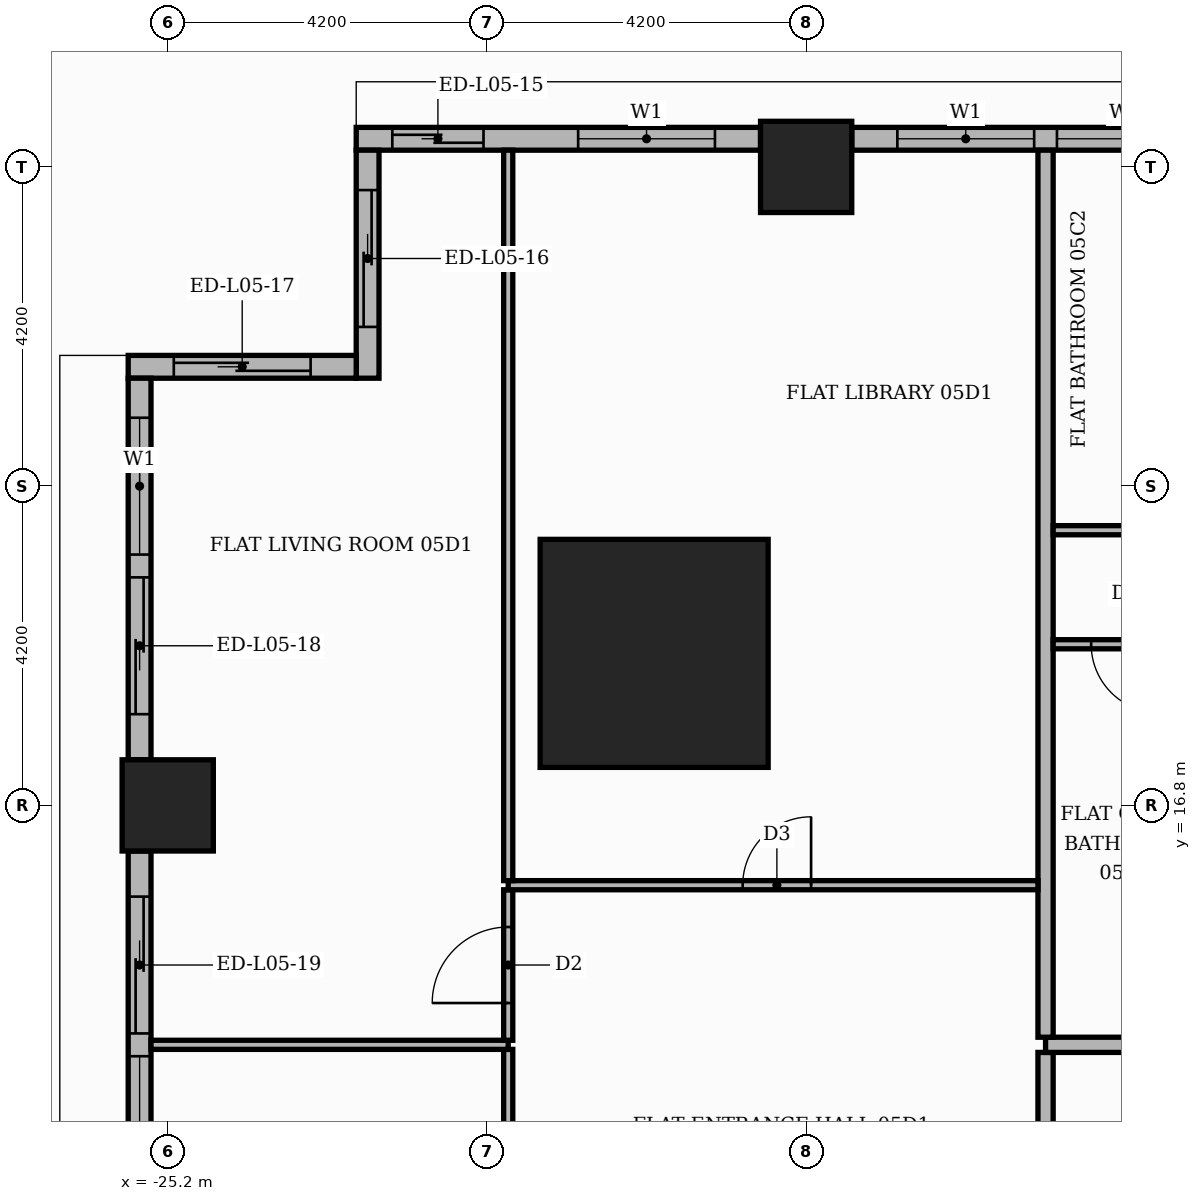
"""IFC4 building model, lengths in metres.
Left out: names, types, materials, properties, quantities, classifications, styles, units other than length and angle.
Written with IfcOpenShell. Run it as: python <this file> out.ifc"""

import sys

from ifc_helpers import new_model, si_unit, direction, frame, frame_2d, origin, origin_2d, place, context, subcontext, project, spatial, rectangle, extrude, element, fill, save


model = new_model("IFC4")
c1 = context("Model", 3, precision=1e-05, world=origin(), true_north=direction((0.0, 1.0)))
c2 = subcontext(c1, "Body", "Model", "MODEL_VIEW")
j1 = project(units=[si_unit("LENGTHUNIT", "METRE"), si_unit("PLANEANGLEUNIT", "RADIAN")], contexts=[c1])
p1 = place(None, origin())
s1 = spatial("IfcSite", under=j1, at=p1, CompositionType="ELEMENT")
p2 = place(p1, origin())
s2 = spatial("IfcBuilding", under=s1, at=p2, CompositionType="ELEMENT")
p3 = place(p2, frame((0.0, 0.0, 27.0)))
s3 = spatial("IfcBuildingStorey", under=s2, at=p3, CompositionType="ELEMENT", Elevation=27.0)
p4 = place(p3, frame((-18.8, 18.8, 0.0), z_axis=(0.0, 0.0, 1.0), x_axis=(1.0, 0.0, 0.0)))
e1 = element("IfcColumn", 1, at=p4, inside=s3, PredefinedType="COLUMN", context=c2, shape_type="SweptSolid", body=[
    extrude(rectangle(XDim=3.0, YDim=3.0, at=origin_2d()), origin(), (0.0, 0.0, 1.0), 3.9),
])
for number, where, z_axis, x_axis in (
    (2, (-16.8, 25.2, 0.0), (0.0, 0.0, 1.0), (1.0, 0.0, 0.0)),
    (3, (-25.2, 16.8, 0.0), (0.0, 0.0, 1.0), (1.0, 0.0, 0.0)),
):
    element("IfcColumn", number, at=place(p3, frame(where, z_axis=z_axis, x_axis=x_axis)), inside=s3, PredefinedType="COLUMN", context=c2, shape_type="SweptSolid", body=[
        extrude(rectangle(XDim=1.2, YDim=1.2, at=origin_2d()), origin(), (0.0, 0.0, 1.0), 3.9),
    ])
p5 = place(p3, frame((-9.0, 25.57, 0.0), z_axis=(0.0, 0.0, 1.0), x_axis=(-1.0, 0.0, 0.0)))
e4 = element("IfcWall", 4, at=p5, inside=s3, PredefinedType="STANDARD", context=c2, shape_type="SweptSolid", body=[
    extrude(rectangle(XDim=7.2, YDim=0.3, at=frame_2d((3.6, 0.0))), origin(), (0.0, 0.0, 1.0), 3.48),
])
p6 = place(p5, frame((0.6, 0.0, 0.9)))
e5 = element("IfcOpeningElement", 5, at=p6, cuts=e4, PredefinedType="OPENING", context=c2, shape_type="SweptSolid", body=[
    extrude(rectangle(XDim=1.8, YDim=2.1, at=frame_2d((0.9, 1.05))), frame((0.0, 0.16, 0.0), z_axis=(0.0, -1.0, 0.0), x_axis=(1.0, 0.0, 0.0)), (0.0, 0.0, 1.0), 0.32),
])
p7 = place(p5, frame((2.7, 0.0, 0.9)))
e6 = element("IfcOpeningElement", 6, at=p7, cuts=e4, PredefinedType="OPENING", context=c2, shape_type="SweptSolid", body=[
    extrude(rectangle(XDim=1.8, YDim=2.1, at=frame_2d((0.9, 1.05))), frame((0.0, 0.16, 0.0), z_axis=(0.0, -1.0, 0.0), x_axis=(1.0, 0.0, 0.0)), (0.0, 0.0, 1.0), 0.32),
])
p8 = place(p5, frame((4.8, 0.0, 0.9)))
e7 = element("IfcOpeningElement", 7, at=p8, cuts=e4, PredefinedType="OPENING", context=c2, shape_type="SweptSolid", body=[
    extrude(rectangle(XDim=1.8, YDim=2.1, at=frame_2d((0.9, 1.05))), frame((0.0, 0.16, 0.0), z_axis=(0.0, -1.0, 0.0), x_axis=(1.0, 0.0, 0.0)), (0.0, 0.0, 1.0), 0.32),
])
p9 = place(p3, frame((-17.4, 25.57, 0.0), z_axis=(0.0, 0.0, 1.0), x_axis=(-1.0, 0.0, 0.0)))
e8 = element("IfcWall", 8, at=p9, inside=s3, PredefinedType="STANDARD", context=c2, shape_type="SweptSolid", body=[
    extrude(rectangle(XDim=5.32, YDim=0.3, at=frame_2d((2.66, 0.0))), origin(), (0.0, 0.0, 1.0), 3.48),
])
p10 = place(p9, frame((0.6, 0.0, 0.9)))
e9 = element("IfcOpeningElement", 9, at=p10, cuts=e8, PredefinedType="OPENING", context=c2, shape_type="SweptSolid", body=[
    extrude(rectangle(XDim=1.8, YDim=2.1, at=frame_2d((0.9, 1.05))), frame((0.0, 0.16, 0.0), z_axis=(0.0, -1.0, 0.0), x_axis=(1.0, 0.0, 0.0)), (0.0, 0.0, 1.0), 0.32),
])
p11 = place(p9, frame((3.645, 0.0, 0.0)))
e10 = element("IfcOpeningElement", 10, at=p11, cuts=e8, PredefinedType="OPENING", context=c2, shape_type="SweptSolid", body=[
    extrude(rectangle(XDim=1.2, YDim=2.4, at=frame_2d((0.6, 1.2))), frame((0.0, 0.16, 0.0), z_axis=(0.0, -1.0, 0.0), x_axis=(1.0, 0.0, 0.0)), (0.0, 0.0, 1.0), 0.32),
])
p12 = place(p3, frame((-22.57, 25.42, 0.0), z_axis=(0.0, 0.0, 1.0), x_axis=(0.0, -1.0, 0.0)))
e11 = element("IfcWall", 11, at=p12, inside=s3, PredefinedType="STANDARD", context=c2, shape_type="SweptSolid", body=[
    extrude(rectangle(XDim=3.0, YDim=0.3, at=frame_2d((1.5, 0.0))), origin(), (0.0, 0.0, 1.0), 3.48),
])
p13 = place(p12, frame((0.525, 0.0, 0.0)))
e12 = element("IfcOpeningElement", 12, at=p13, cuts=e11, PredefinedType="OPENING", context=c2, shape_type="SweptSolid", body=[
    extrude(rectangle(XDim=1.8, YDim=2.4, at=frame_2d((0.9, 1.2))), frame((0.0, 0.16, 0.0), z_axis=(0.0, -1.0, 0.0), x_axis=(1.0, 0.0, 0.0)), (0.0, 0.0, 1.0), 0.32),
])
p14 = place(p3, frame((-22.72, 22.57, 0.0), z_axis=(0.0, 0.0, 1.0), x_axis=(-1.0, 0.0, 0.0)))
e13 = element("IfcWall", 13, at=p14, inside=s3, PredefinedType="STANDARD", context=c2, shape_type="SweptSolid", body=[
    extrude(rectangle(XDim=3.0, YDim=0.3, at=frame_2d((1.5, 0.0))), origin(), (0.0, 0.0, 1.0), 3.48),
])
p15 = place(p14, frame((0.6, 0.0, 0.0)))
e14 = element("IfcOpeningElement", 14, at=p15, cuts=e13, PredefinedType="OPENING", context=c2, shape_type="SweptSolid", body=[
    extrude(rectangle(XDim=1.8, YDim=2.4, at=frame_2d((0.9, 1.2))), frame((0.0, 0.16, 0.0), z_axis=(0.0, -1.0, 0.0), x_axis=(1.0, 0.0, 0.0)), (0.0, 0.0, 1.0), 0.32),
])
p16 = place(p3, frame((-25.57, 22.42, 0.0), z_axis=(0.0, 0.0, 1.0), x_axis=(0.0, -1.0, 0.0)))
e15 = element("IfcWall", 15, at=p16, inside=s3, PredefinedType="STANDARD", context=c2, shape_type="SweptSolid", body=[
    extrude(rectangle(XDim=5.02, YDim=0.3, at=frame_2d((2.51, 0.0))), origin(), (0.0, 0.0, 1.0), 3.48),
])
p17 = place(p16, frame((0.52, 0.0, 0.9)))
e16 = element("IfcOpeningElement", 16, at=p17, cuts=e15, PredefinedType="OPENING", context=c2, shape_type="SweptSolid", body=[
    extrude(rectangle(XDim=1.8, YDim=2.1, at=frame_2d((0.9, 1.05))), frame((0.0, 0.16, 0.0), z_axis=(0.0, -1.0, 0.0), x_axis=(1.0, 0.0, 0.0)), (0.0, 0.0, 1.0), 0.32),
])
p18 = place(p16, frame((2.62, 0.0, 0.0)))
e17 = element("IfcOpeningElement", 17, at=p18, cuts=e15, PredefinedType="OPENING", context=c2, shape_type="SweptSolid", body=[
    extrude(rectangle(XDim=1.8, YDim=2.4, at=frame_2d((0.9, 1.2))), frame((0.0, 0.16, 0.0), z_axis=(0.0, -1.0, 0.0), x_axis=(1.0, 0.0, 0.0)), (0.0, 0.0, 1.0), 0.32),
])
p19 = place(p3, frame((-25.57, 16.2, 0.0), z_axis=(0.0, 0.0, 1.0), x_axis=(0.0, -1.0, 0.0)))
e18 = element("IfcWall", 18, at=p19, inside=s3, PredefinedType="STANDARD", context=c2, shape_type="SweptSolid", body=[
    extrude(rectangle(XDim=7.2, YDim=0.3, at=frame_2d((3.6, 0.0))), origin(), (0.0, 0.0, 1.0), 3.48),
])
p20 = place(p19, frame((0.6, 0.0, 0.0)))
e19 = element("IfcOpeningElement", 19, at=p20, cuts=e18, PredefinedType="OPENING", context=c2, shape_type="SweptSolid", body=[
    extrude(rectangle(XDim=1.8, YDim=2.4, at=frame_2d((0.9, 1.2))), frame((0.0, 0.16, 0.0), z_axis=(0.0, -1.0, 0.0), x_axis=(1.0, 0.0, 0.0)), (0.0, 0.0, 1.0), 0.32),
])
p21 = place(p19, frame((2.7, 0.0, 0.9)))
e20 = element("IfcOpeningElement", 20, at=p21, cuts=e18, PredefinedType="OPENING", context=c2, shape_type="SweptSolid", body=[
    extrude(rectangle(XDim=3.9, YDim=2.1, at=frame_2d((1.95, 1.05))), frame((0.0, 0.16, 0.0), z_axis=(0.0, -1.0, 0.0), x_axis=(1.0, 0.0, 0.0)), (0.0, 0.0, 1.0), 0.32),
])
p22 = place(p3, frame((-13.65, -13.55, 0.0), z_axis=(0.0, 0.0, 1.0), x_axis=(0.0, 1.0, 0.0)))
e21 = element("IfcWall", 21, at=p22, inside=s3, PredefinedType="PARTITIONING", context=c2, shape_type="SweptSolid", body=[
    extrude(rectangle(XDim=27.1, YDim=0.2, at=frame_2d((13.55, 0.0))), origin(), (0.0, 0.0, 1.0), 3.48),
])
p23 = place(p22, frame((24.55, 0.0, 0.0)))
e22 = element("IfcOpeningElement", 22, at=p23, cuts=e21, PredefinedType="OPENING", context=c2, shape_type="SweptSolid", body=[
    extrude(rectangle(XDim=1.1, YDim=2.4, at=frame_2d((0.55, 1.2))), frame((0.0, 0.11, 0.0), z_axis=(0.0, -1.0, 0.0), x_axis=(1.0, 0.0, 0.0)), (0.0, 0.0, 1.0), 0.22),
])
p24 = place(p3, frame((-20.72, 9.51, 0.0), z_axis=(0.0, 0.0, 1.0), x_axis=(0.0, 1.0, 0.0)))
e23 = element("IfcWall", 23, at=p24, inside=s3, PredefinedType="PARTITIONING", context=c2, shape_type="SweptSolid", body=[
    extrude(rectangle(XDim=4.08, YDim=0.12, at=frame_2d((2.04, 0.0))), origin(), (0.0, 0.0, 1.0), 3.48),
])
p25 = place(p24, frame((1.59, 0.0, 0.0)))
e24 = element("IfcOpeningElement", 24, at=p25, cuts=e23, PredefinedType="OPENING", context=c2, shape_type="SweptSolid", body=[
    extrude(rectangle(XDim=0.9, YDim=2.1, at=frame_2d((0.45, 1.05))), frame((0.0, 0.07, 0.0), z_axis=(0.0, -1.0, 0.0), x_axis=(1.0, 0.0, 0.0)), (0.0, 0.0, 1.0), 0.14),
])
p26 = place(p3, frame((-25.42, 13.65, 0.0), z_axis=(0.0, 0.0, 1.0), x_axis=(1.0, 0.0, 0.0)))
e25 = element("IfcWall", 25, at=p26, inside=s3, PredefinedType="PARTITIONING", context=c2, shape_type="SweptSolid", body=[
    extrude(rectangle(XDim=4.7, YDim=0.12, at=frame_2d((2.35, 0.0))), origin(), (0.0, 0.0, 1.0), 3.48),
])
p27 = place(p3, frame((-13.65, 13.65, 0.0), z_axis=(0.0, 0.0, 1.0), x_axis=(1.0, 0.0, 0.0)))
e26 = element("IfcWall", 26, at=p27, inside=s3, PredefinedType="PARTITIONING", context=c2, shape_type="SweptSolid", body=[
    extrude(rectangle(XDim=39.07, YDim=0.2, at=frame_2d((19.535, 0.0))), origin(), (0.0, 0.0, 1.0), 3.48),
])
p28 = place(p27, frame((24.65, 0.0, 0.0)))
e27 = element("IfcOpeningElement", 27, at=p28, cuts=e26, PredefinedType="OPENING", context=c2, shape_type="SweptSolid", body=[
    extrude(rectangle(XDim=1.1, YDim=2.4, at=frame_2d((0.55, 1.2))), frame((0.0, 0.11, 0.0), z_axis=(0.0, -1.0, 0.0), x_axis=(1.0, 0.0, 0.0)), (0.0, 0.0, 1.0), 0.22),
])
p29 = place(p27, frame((14.15, 0.0, 0.0)))
e28 = element("IfcOpeningElement", 28, at=p29, cuts=e26, PredefinedType="OPENING", context=c2, shape_type="SweptSolid", body=[
    extrude(rectangle(XDim=1.1, YDim=2.4, at=frame_2d((0.55, 1.2))), frame((0.0, 0.11, 0.0), z_axis=(0.0, -1.0, 0.0), x_axis=(1.0, 0.0, 0.0)), (0.0, 0.0, 1.0), 0.22),
])
p30 = place(p3, frame((-20.72, 13.71, 0.0), z_axis=(0.0, 0.0, 1.0), x_axis=(0.0, 1.0, 0.0)))
e29 = element("IfcWall", 29, at=p30, inside=s3, PredefinedType="PARTITIONING", context=c2, shape_type="SweptSolid", body=[
    extrude(rectangle(XDim=1.98, YDim=0.12, at=frame_2d((0.99, 0.0))), origin(), (0.0, 0.0, 1.0), 3.48),
])
p31 = place(p30, frame((0.49, 0.0, 0.0)))
e30 = element("IfcOpeningElement", 30, at=p31, cuts=e29, PredefinedType="OPENING", context=c2, shape_type="SweptSolid", body=[
    extrude(rectangle(XDim=1.0, YDim=2.1, at=frame_2d((0.5, 1.05))), frame((0.0, 0.07, 0.0), z_axis=(0.0, -1.0, 0.0), x_axis=(1.0, 0.0, 0.0)), (0.0, 0.0, 1.0), 0.14),
])
p32 = place(p3, frame((-13.65, 13.75, 0.0), z_axis=(0.0, 0.0, 1.0), x_axis=(0.0, 1.0, 0.0)))
e31 = element("IfcWall", 31, at=p32, inside=s3, PredefinedType="PARTITIONING", context=c2, shape_type="SweptSolid", body=[
    extrude(rectangle(XDim=11.67, YDim=0.2, at=frame_2d((5.835, 0.0))), origin(), (0.0, 0.0, 1.0), 3.48),
])
p33 = place(p3, frame((-20.72, 15.75, 0.0), z_axis=(0.0, 0.0, 1.0), x_axis=(1.0, 0.0, 0.0)))
e32 = element("IfcWall", 32, at=p33, inside=s3, PredefinedType="PARTITIONING", context=c2, shape_type="SweptSolid", body=[
    extrude(rectangle(XDim=6.97, YDim=0.12, at=frame_2d((3.485, 0.0))), origin(), (0.0, 0.0, 1.0), 3.48),
])
p34 = place(p33, frame((3.085, 0.0, 0.0)))
e33 = element("IfcOpeningElement", 33, at=p34, cuts=e32, PredefinedType="OPENING", context=c2, shape_type="SweptSolid", body=[
    extrude(rectangle(XDim=0.9, YDim=2.1, at=frame_2d((0.45, 1.05))), frame((0.0, 0.07, 0.0), z_axis=(0.0, -1.0, 0.0), x_axis=(1.0, 0.0, 0.0)), (0.0, 0.0, 1.0), 0.14),
])
p35 = place(p3, frame((-20.72, 15.81, 0.0), z_axis=(0.0, 0.0, 1.0), x_axis=(0.0, 1.0, 0.0)))
e34 = element("IfcWall", 34, at=p35, inside=s3, PredefinedType="PARTITIONING", context=c2, shape_type="SweptSolid", body=[
    extrude(rectangle(XDim=9.61, YDim=0.12, at=frame_2d((4.805, 0.0))), origin(), (0.0, 0.0, 1.0), 3.48),
])
p36 = place(p3, frame((-13.55, 18.92, 0.0), z_axis=(0.0, 0.0, 1.0), x_axis=(1.0, 0.0, 0.0)))
e35 = element("IfcWall", 35, at=p36, inside=s3, PredefinedType="PARTITIONING", context=c2, shape_type="SweptSolid", body=[
    extrude(rectangle(XDim=12.5, YDim=0.12, at=frame_2d((6.25, 0.0))), origin(), (0.0, 0.0, 1.0), 3.48),
])
p37 = place(p36, frame((8.9, 0.0, 0.0)))
e36 = element("IfcOpeningElement", 36, at=p37, cuts=e35, PredefinedType="OPENING", context=c2, shape_type="SweptSolid", body=[
    extrude(rectangle(XDim=0.9, YDim=2.1, at=frame_2d((0.45, 1.05))), frame((0.0, 0.07, 0.0), z_axis=(0.0, -1.0, 0.0), x_axis=(1.0, 0.0, 0.0)), (0.0, 0.0, 1.0), 0.14),
])
p38 = place(p36, frame((4.7, 0.0, 0.0)))
e37 = element("IfcOpeningElement", 37, at=p38, cuts=e35, PredefinedType="OPENING", context=c2, shape_type="SweptSolid", body=[
    extrude(rectangle(XDim=0.9, YDim=2.1, at=frame_2d((0.45, 1.05))), frame((0.0, 0.07, 0.0), z_axis=(0.0, -1.0, 0.0), x_axis=(1.0, 0.0, 0.0)), (0.0, 0.0, 1.0), 0.14),
])
p39 = place(p36, frame((2.6, 0.0, 0.0)))
e38 = element("IfcOpeningElement", 38, at=p39, cuts=e35, PredefinedType="OPENING", context=c2, shape_type="SweptSolid", body=[
    extrude(rectangle(XDim=0.9, YDim=2.1, at=frame_2d((0.45, 1.05))), frame((0.0, 0.07, 0.0), z_axis=(0.0, -1.0, 0.0), x_axis=(1.0, 0.0, 0.0)), (0.0, 0.0, 1.0), 0.14),
])
p40 = place(p36, frame((0.5, 0.0, 0.0)))
e39 = element("IfcOpeningElement", 39, at=p40, cuts=e35, PredefinedType="OPENING", context=c2, shape_type="SweptSolid", body=[
    extrude(rectangle(XDim=0.9, YDim=2.1, at=frame_2d((0.45, 1.05))), frame((0.0, 0.07, 0.0), z_axis=(0.0, -1.0, 0.0), x_axis=(1.0, 0.0, 0.0)), (0.0, 0.0, 1.0), 0.14),
])
p41 = place(p3, frame((-13.55, 20.42, 0.0), z_axis=(0.0, 0.0, 1.0), x_axis=(1.0, 0.0, 0.0)))
e40 = element("IfcWall", 40, at=p41, inside=s3, PredefinedType="PARTITIONING", context=c2, shape_type="SweptSolid", body=[
    extrude(rectangle(XDim=18.7, YDim=0.12, at=frame_2d((9.35, 0.0))), origin(), (0.0, 0.0, 1.0), 3.48),
])
p42 = place(p41, frame((16.2, 0.0, 0.0)))
e41 = element("IfcOpeningElement", 41, at=p42, cuts=e40, PredefinedType="OPENING", context=c2, shape_type="SweptSolid", body=[
    extrude(rectangle(XDim=1.0, YDim=2.1, at=frame_2d((0.5, 1.05))), frame((0.0, 0.07, 0.0), z_axis=(0.0, -1.0, 0.0), x_axis=(1.0, 0.0, 0.0)), (0.0, 0.0, 1.0), 0.14),
])
p43 = place(p41, frame((12.05, 0.0, 0.0)))
e42 = element("IfcOpeningElement", 42, at=p43, cuts=e40, PredefinedType="OPENING", context=c2, shape_type="SweptSolid", body=[
    extrude(rectangle(XDim=0.9, YDim=2.1, at=frame_2d((0.45, 1.05))), frame((0.0, 0.07, 0.0), z_axis=(0.0, -1.0, 0.0), x_axis=(1.0, 0.0, 0.0)), (0.0, 0.0, 1.0), 0.14),
])
p44 = place(p41, frame((3.65, 0.0, 0.0)))
e43 = element("IfcOpeningElement", 43, at=p44, cuts=e40, PredefinedType="OPENING", context=c2, shape_type="SweptSolid", body=[
    extrude(rectangle(XDim=0.9, YDim=2.1, at=frame_2d((0.45, 1.05))), frame((0.0, 0.07, 0.0), z_axis=(0.0, -1.0, 0.0), x_axis=(1.0, 0.0, 0.0)), (0.0, 0.0, 1.0), 0.14),
])
p45 = place(p7, origin())
e44 = element("IfcWindow", 44, at=p45, inside=s3, PartitioningType="SINGLE_PANEL", PredefinedType="WINDOW", context=c2, shape_type="SweptSolid", body=[
    extrude(rectangle(XDim=1.8, YDim=2.1, at=frame_2d((0.9, 1.05))), frame((0.0, 0.03, 0.0), z_axis=(0.0, -1.0, 0.0), x_axis=(1.0, 0.0, 0.0)), (0.0, 0.0, 1.0), 0.06),
])
fill(e6, e44)
p46 = place(p8, origin())
e45 = element("IfcWindow", 45, at=p46, inside=s3, PartitioningType="SINGLE_PANEL", PredefinedType="WINDOW", context=c2, shape_type="SweptSolid", body=[
    extrude(rectangle(XDim=1.8, YDim=2.1, at=frame_2d((0.9, 1.05))), frame((0.0, 0.03, 0.0), z_axis=(0.0, -1.0, 0.0), x_axis=(1.0, 0.0, 0.0)), (0.0, 0.0, 1.0), 0.06),
])
fill(e7, e45)
p47 = place(p10, origin())
e46 = element("IfcWindow", 46, at=p47, inside=s3, PartitioningType="SINGLE_PANEL", PredefinedType="WINDOW", context=c2, shape_type="SweptSolid", body=[
    extrude(rectangle(XDim=1.8, YDim=2.1, at=frame_2d((0.9, 1.05))), frame((0.0, 0.03, 0.0), z_axis=(0.0, -1.0, 0.0), x_axis=(1.0, 0.0, 0.0)), (0.0, 0.0, 1.0), 0.06),
])
fill(e9, e46)
p48 = place(p11, origin())
e47 = element("IfcDoor", 47, at=p48, inside=s3, OperationType="SLIDING_TO_RIGHT", PredefinedType="DOOR", context=c2, shape_type="SweptSolid", body=[
    extrude(rectangle(XDim=1.2, YDim=2.4, at=frame_2d((0.6, 1.2))), frame((0.0, 0.025, 0.0), z_axis=(0.0, -1.0, 0.0), x_axis=(1.0, 0.0, 0.0)), (0.0, 0.0, 1.0), 0.05),
])
fill(e10, e47)
p49 = place(p13, origin())
e48 = element("IfcDoor", 48, at=p49, inside=s3, OperationType="SLIDING_TO_LEFT", PredefinedType="DOOR", context=c2, shape_type="SweptSolid", body=[
    extrude(rectangle(XDim=1.8, YDim=2.4, at=frame_2d((0.9, 1.2))), frame((0.0, 0.025, 0.0), z_axis=(0.0, -1.0, 0.0), x_axis=(1.0, 0.0, 0.0)), (0.0, 0.0, 1.0), 0.05),
])
fill(e12, e48)
p50 = place(p15, origin())
e49 = element("IfcDoor", 49, at=p50, inside=s3, OperationType="SLIDING_TO_RIGHT", PredefinedType="DOOR", context=c2, shape_type="SweptSolid", body=[
    extrude(rectangle(XDim=1.8, YDim=2.4, at=frame_2d((0.9, 1.2))), frame((0.0, 0.025, 0.0), z_axis=(0.0, -1.0, 0.0), x_axis=(1.0, 0.0, 0.0)), (0.0, 0.0, 1.0), 0.05),
])
fill(e14, e49)
p51 = place(p17, origin())
e50 = element("IfcWindow", 50, at=p51, inside=s3, PartitioningType="SINGLE_PANEL", PredefinedType="WINDOW", context=c2, shape_type="SweptSolid", body=[
    extrude(rectangle(XDim=1.8, YDim=2.1, at=frame_2d((0.9, 1.05))), frame((0.0, 0.03, 0.0), z_axis=(0.0, -1.0, 0.0), x_axis=(1.0, 0.0, 0.0)), (0.0, 0.0, 1.0), 0.06),
])
fill(e16, e50)
p52 = place(p18, origin())
e51 = element("IfcDoor", 51, at=p52, inside=s3, OperationType="SLIDING_TO_RIGHT", PredefinedType="DOOR", context=c2, shape_type="SweptSolid", body=[
    extrude(rectangle(XDim=1.8, YDim=2.4, at=frame_2d((0.9, 1.2))), frame((0.0, 0.025, 0.0), z_axis=(0.0, -1.0, 0.0), x_axis=(1.0, 0.0, 0.0)), (0.0, 0.0, 1.0), 0.05),
])
fill(e17, e51)
p53 = place(p20, origin())
e52 = element("IfcDoor", 52, at=p53, inside=s3, OperationType="SLIDING_TO_LEFT", PredefinedType="DOOR", context=c2, shape_type="SweptSolid", body=[
    extrude(rectangle(XDim=1.8, YDim=2.4, at=frame_2d((0.9, 1.2))), frame((0.0, 0.025, 0.0), z_axis=(0.0, -1.0, 0.0), x_axis=(1.0, 0.0, 0.0)), (0.0, 0.0, 1.0), 0.05),
])
fill(e19, e52)
p54 = place(p21, origin())
e53 = element("IfcWindow", 53, at=p54, inside=s3, PartitioningType="SINGLE_PANEL", PredefinedType="WINDOW", context=c2, shape_type="SweptSolid", body=[
    extrude(rectangle(XDim=3.9, YDim=2.1, at=frame_2d((1.95, 1.05))), frame((0.0, 0.03, 0.0), z_axis=(0.0, -1.0, 0.0), x_axis=(1.0, 0.0, 0.0)), (0.0, 0.0, 1.0), 0.06),
])
fill(e20, e53)
p55 = place(p40, frame((0.9, 0.0, 0.0), z_axis=(0.0, 0.0, 1.0), x_axis=(-1.0, 0.0, 0.0)))
e54 = element("IfcDoor", 54, at=p55, inside=s3, OperationType="SINGLE_SWING_RIGHT", PredefinedType="DOOR", context=c2, shape_type="SweptSolid", body=[
    extrude(rectangle(XDim=0.9, YDim=2.1, at=frame_2d((0.45, 1.05))), frame((0.0, 0.025, 0.0), z_axis=(0.0, -1.0, 0.0), x_axis=(1.0, 0.0, 0.0)), (0.0, 0.0, 1.0), 0.05),
])
fill(e39, e54)
p56 = place(p34, origin())
e55 = element("IfcDoor", 55, at=p56, inside=s3, OperationType="SINGLE_SWING_RIGHT", PredefinedType="DOOR", context=c2, shape_type="SweptSolid", body=[
    extrude(rectangle(XDim=0.9, YDim=2.1, at=frame_2d((0.45, 1.05))), frame((0.0, 0.025, 0.0), z_axis=(0.0, -1.0, 0.0), x_axis=(1.0, 0.0, 0.0)), (0.0, 0.0, 1.0), 0.05),
])
fill(e33, e55)
p57 = place(p31, origin())
e56 = element("IfcDoor", 56, at=p57, inside=s3, OperationType="SINGLE_SWING_LEFT", PredefinedType="DOOR", context=c2, shape_type="SweptSolid", body=[
    extrude(rectangle(XDim=1.0, YDim=2.1, at=frame_2d((0.5, 1.05))), frame((0.0, 0.025, 0.0), z_axis=(0.0, -1.0, 0.0), x_axis=(1.0, 0.0, 0.0)), (0.0, 0.0, 1.0), 0.05),
])
fill(e30, e56)
save(model, sys.argv[1])
